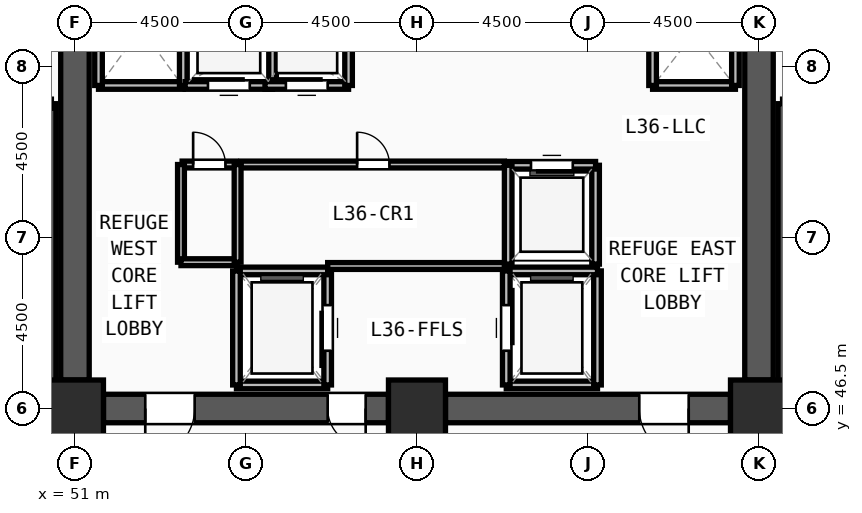
"""IFC4 building model, lengths in metres.
Left out: names, types, materials, properties, quantities, classifications, styles, units other than length and angle.
Written with IfcOpenShell. Run it as: python <this file> out.ifc"""

import sys

from ifc_helpers import new_model, si_unit, direction, frame, frame_2d, origin, origin_2d, place, context, subcontext, project, spatial, rectangle, extrude, source, transform, mapped, element, fill, save


model = new_model("IFC4")
c1 = context("Model", 3, precision=1e-05, world=origin(), true_north=direction((0.0, 1.0)))
c2 = subcontext(c1, "Body", "Model", "MODEL_VIEW")
j1 = project(units=[si_unit("LENGTHUNIT", "METRE"), si_unit("PLANEANGLEUNIT", "RADIAN")], contexts=[c1])
p1 = place(None, origin())
s1 = spatial("IfcSite", under=j1, at=p1, CompositionType="ELEMENT")
p2 = place(p1, origin())
s2 = spatial("IfcBuilding", under=s1, at=p2, CompositionType="ELEMENT")
p3 = place(p2, frame((0.0, 0.0, 139.5)))
s3 = spatial("IfcBuildingStorey", under=s2, at=p3, CompositionType="ELEMENT", Elevation=139.5)
m1 = source(origin(), c2, "Body", "SweptSolid", [
    extrude(rectangle(XDim=1.5, YDim=1.5, at=origin_2d()), origin(), (0.0, 0.0, 1.0), 4.5),
])
for number, where, z_axis, x_axis in (
    (1, (51.0, 46.5, 0.0), (0.0, 0.0, 1.0), (1.0, 0.0, 0.0)),
    (2, (60.0, 46.5, 0.0), (0.0, 0.0, 1.0), (1.0, 0.0, 0.0)),
    (3, (69.0, 46.5, 0.0), (0.0, 0.0, 1.0), (1.0, 0.0, 0.0)),
):
    element("IfcColumn", number, at=place(p3, frame(where, z_axis=z_axis, x_axis=x_axis)), inside=s3, PredefinedType="COLUMN", context=c2, shape_type="MappedRepresentation", body=[
        mapped(m1, transform((0.0, 0.0, 0.0), x_axis=(1.0, 0.0, 0.0), y_axis=(0.0, 1.0, 0.0), z_axis=(0.0, 0.0, 1.0), scale=1.0)),
    ])
p4 = place(p3, frame((69.0, 60.75, 0.0), z_axis=(0.0, 0.0, 1.0), x_axis=(0.0, -1.0, 0.0)))
e4 = element("IfcWall", 4, at=p4, inside=s3, PredefinedType="SHEAR", context=c2, shape_type="SweptSolid", body=[
    extrude(rectangle(XDim=13.5, YDim=0.75, at=frame_2d((6.75, 0.0))), origin(), (0.0, 0.0, 1.0), 4.32),
])
m2 = source(origin(), c2, "Body", "SweptSolid", [
    extrude(rectangle(XDim=1.2, YDim=2.2, at=frame_2d((0.6, 1.1))), frame((0.0, 0.385, 0.0), z_axis=(0.0, -1.0, 0.0), x_axis=(1.0, 0.0, 0.0)), (0.0, 0.0, 1.0), 0.77),
])
p5 = place(p4, frame((1.2, 0.0, 0.0)))
e5 = element("IfcOpeningElement", 5, at=p5, cuts=e4, PredefinedType="OPENING", context=c2, shape_type="MappedRepresentation", body=[
    mapped(m2, transform((0.0, 0.0, 0.0), x_axis=(1.0, 0.0, 0.0), y_axis=(0.0, 1.0, 0.0), z_axis=(0.0, 0.0, 1.0), scale=1.0)),
])
p6 = place(p3, frame((68.25, 46.5, 0.0), z_axis=(0.0, 0.0, 1.0), x_axis=(-1.0, 0.0, 0.0)))
e6 = element("IfcWall", 6, at=p6, inside=s3, PredefinedType="SHEAR", context=c2, shape_type="SweptSolid", body=[
    extrude(rectangle(XDim=7.5, YDim=0.75, at=frame_2d((3.75, 0.0))), origin(), (0.0, 0.0, 1.0), 4.32),
])
m3 = source(origin(), c2, "Body", "SweptSolid", [
    extrude(rectangle(XDim=1.3, YDim=2.2, at=frame_2d((0.65, 1.1))), frame((0.0, 0.385, 0.0), z_axis=(0.0, -1.0, 0.0), x_axis=(1.0, 0.0, 0.0)), (0.0, 0.0, 1.0), 0.77),
])
p7 = place(p6, frame((1.1, 0.0, 0.0)))
e7 = element("IfcOpeningElement", 7, at=p7, cuts=e6, PredefinedType="OPENING", context=c2, shape_type="MappedRepresentation", body=[
    mapped(m3, transform((0.0, 0.0, 0.0), x_axis=(1.0, 0.0, 0.0), y_axis=(0.0, 1.0, 0.0), z_axis=(0.0, 0.0, 1.0), scale=1.0)),
])
p8 = place(p3, frame((59.25, 46.5, 0.0), z_axis=(0.0, 0.0, 1.0), x_axis=(-1.0, 0.0, 0.0)))
e8 = element("IfcWall", 8, at=p8, inside=s3, PredefinedType="SHEAR", context=c2, shape_type="SweptSolid", body=[
    extrude(rectangle(XDim=7.5, YDim=0.75, at=frame_2d((3.75, 0.0))), origin(), (0.0, 0.0, 1.0), 4.32),
])
p9 = place(p8, frame((5.1, 0.0, 0.0)))
e9 = element("IfcOpeningElement", 9, at=p9, cuts=e8, PredefinedType="OPENING", context=c2, shape_type="MappedRepresentation", body=[
    mapped(m3, transform((0.0, 0.0, 0.0), x_axis=(1.0, 0.0, 0.0), y_axis=(0.0, 1.0, 0.0), z_axis=(0.0, 0.0, 1.0), scale=1.0)),
])
m4 = source(origin(), c2, "Body", "SweptSolid", [
    extrude(rectangle(XDim=1.0, YDim=2.2, at=frame_2d((0.5, 1.1))), frame((0.0, 0.385, 0.0), z_axis=(0.0, -1.0, 0.0), x_axis=(1.0, 0.0, 0.0)), (0.0, 0.0, 1.0), 0.77),
])
p10 = place(p8, frame((0.6, 0.0, 0.0)))
e10 = element("IfcOpeningElement", 10, at=p10, cuts=e8, PredefinedType="OPENING", context=c2, shape_type="MappedRepresentation", body=[
    mapped(m4, transform((0.0, 0.0, 0.0), x_axis=(1.0, 0.0, 0.0), y_axis=(0.0, 1.0, 0.0), z_axis=(0.0, 0.0, 1.0), scale=1.0)),
])
p11 = place(p3, frame((51.0, 47.25, 0.0), z_axis=(0.0, 0.0, 1.0), x_axis=(0.0, 1.0, 0.0)))
e11 = element("IfcWall", 11, at=p11, inside=s3, PredefinedType="SHEAR", context=c2, shape_type="SweptSolid", body=[
    extrude(rectangle(XDim=13.5, YDim=0.75, at=frame_2d((6.75, 0.0))), origin(), (0.0, 0.0, 1.0), 4.32),
])
for number, where, z_axis, x_axis in (
    (12, (50.38, 46.7, 0.0), (0.0, 0.0, 1.0), (0.0, 1.0, 0.0)),
    (13, (69.62, 54.52, 0.0), (0.0, 0.0, 1.0), (0.0, -1.0, 0.0)),
):
    element("IfcWall", number, at=place(p3, frame(where, z_axis=z_axis, x_axis=x_axis)), inside=s3, PredefinedType="SOLIDWALL", context=c2, shape_type="SweptSolid", body=[
        extrude(rectangle(XDim=7.82, YDim=0.24, at=frame_2d((3.91, 0.0))), origin(), (0.0, 0.0, 1.0), 4.32),
    ])
p12 = place(p3, frame((55.25, 47.12, 0.0), z_axis=(0.0, 0.0, 1.0), x_axis=(1.0, 0.0, 0.0)))
e14 = element("IfcWall", 14, at=p12, inside=s3, PredefinedType="SOLIDWALL", context=c2, shape_type="SweptSolid", body=[
    extrude(rectangle(XDim=2.4, YDim=0.2, at=frame_2d((1.2, 0.0))), origin(), (0.0, 0.0, 1.0), 4.32),
])
p13 = place(p3, frame((57.65, 47.12, 0.0), z_axis=(0.0, 0.0, 1.0), x_axis=(0.0, 1.0, 0.0)))
e15 = element("IfcWall", 15, at=p13, inside=s3, PredefinedType="SOLIDWALL", context=c2, shape_type="SweptSolid", body=[
    extrude(rectangle(XDim=3.0, YDim=0.2, at=frame_2d((1.5, 0.0))), origin(), (0.0, 0.0, 1.0), 4.32),
])
m5 = source(origin(), c2, "Body", "SweptSolid", [
    extrude(rectangle(XDim=1.2, YDim=2.3, at=frame_2d((0.6, 1.15))), frame((0.0, 0.11, 0.0), z_axis=(0.0, -1.0, 0.0), x_axis=(1.0, 0.0, 0.0)), (0.0, 0.0, 1.0), 0.22),
])
p14 = place(p13, frame((0.9, 0.0, 0.0)))
e16 = element("IfcOpeningElement", 16, at=p14, cuts=e15, PredefinedType="OPENING", context=c2, shape_type="MappedRepresentation", body=[
    mapped(m5, transform((0.0, 0.0, 0.0), x_axis=(1.0, 0.0, 0.0), y_axis=(0.0, 1.0, 0.0), z_axis=(0.0, 0.0, 1.0), scale=1.0)),
])
p15 = place(p3, frame((57.65, 50.12, 0.0), z_axis=(0.0, 0.0, 1.0), x_axis=(-1.0, 0.0, 0.0)))
e17 = element("IfcWall", 17, at=p15, inside=s3, PredefinedType="SOLIDWALL", context=c2, shape_type="SweptSolid", body=[
    extrude(rectangle(XDim=2.4, YDim=0.2, at=frame_2d((1.2, 0.0))), origin(), (0.0, 0.0, 1.0), 4.32),
])
p16 = place(p3, frame((55.25, 50.12, 0.0), z_axis=(0.0, 0.0, 1.0), x_axis=(0.0, -1.0, 0.0)))
e18 = element("IfcWall", 18, at=p16, inside=s3, PredefinedType="SOLIDWALL", context=c2, shape_type="SweptSolid", body=[
    extrude(rectangle(XDim=3.0, YDim=0.2, at=frame_2d((1.5, 0.0))), origin(), (0.0, 0.0, 1.0), 4.32),
])
p17 = place(p3, frame((62.35, 47.12, 0.0), z_axis=(0.0, 0.0, 1.0), x_axis=(1.0, 0.0, 0.0)))
e19 = element("IfcWall", 19, at=p17, inside=s3, PredefinedType="SOLIDWALL", context=c2, shape_type="SweptSolid", body=[
    extrude(rectangle(XDim=2.4, YDim=0.2, at=frame_2d((1.2, 0.0))), origin(), (0.0, 0.0, 1.0), 4.32),
])
p18 = place(p3, frame((64.75, 47.12, 0.0), z_axis=(0.0, 0.0, 1.0), x_axis=(0.0, 1.0, 0.0)))
e20 = element("IfcWall", 20, at=p18, inside=s3, PredefinedType="SOLIDWALL", context=c2, shape_type="SweptSolid", body=[
    extrude(rectangle(XDim=3.0, YDim=0.2, at=frame_2d((1.5, 0.0))), origin(), (0.0, 0.0, 1.0), 4.32),
])
p19 = place(p3, frame((64.75, 50.12, 0.0), z_axis=(0.0, 0.0, 1.0), x_axis=(-1.0, 0.0, 0.0)))
e21 = element("IfcWall", 21, at=p19, inside=s3, PredefinedType="SOLIDWALL", context=c2, shape_type="SweptSolid", body=[
    extrude(rectangle(XDim=2.4, YDim=0.2, at=frame_2d((1.2, 0.0))), origin(), (0.0, 0.0, 1.0), 4.32),
])
p20 = place(p3, frame((62.35, 50.12, 0.0), z_axis=(0.0, 0.0, 1.0), x_axis=(0.0, -1.0, 0.0)))
e22 = element("IfcWall", 22, at=p20, inside=s3, PredefinedType="SOLIDWALL", context=c2, shape_type="SweptSolid", body=[
    extrude(rectangle(XDim=3.0, YDim=0.2, at=frame_2d((1.5, 0.0))), origin(), (0.0, 0.0, 1.0), 4.32),
])
p21 = place(p20, frame((0.9, 0.0, 0.0)))
e23 = element("IfcOpeningElement", 23, at=p21, cuts=e22, PredefinedType="OPENING", context=c2, shape_type="MappedRepresentation", body=[
    mapped(m5, transform((0.0, 0.0, 0.0), x_axis=(1.0, 0.0, 0.0), y_axis=(0.0, 1.0, 0.0), z_axis=(0.0, 0.0, 1.0), scale=1.0)),
])
p22 = place(p3, frame((51.62, 55.0, 0.0), z_axis=(0.0, 0.0, 1.0), x_axis=(1.0, 0.0, 0.0)))
e24 = element("IfcWall", 24, at=p22, inside=s3, PredefinedType="SOLIDWALL", context=c2, shape_type="SweptSolid", body=[
    extrude(rectangle(XDim=2.23, YDim=0.2, at=frame_2d((1.115, 0.0))), origin(), (0.0, 0.0, 1.0), 4.32),
])
for number, where, z_axis, x_axis in (
    (25, (53.85, 55.0, 0.0), (0.0, 0.0, 1.0), (0.0, 1.0, 0.0)),
    (26, (51.62, 58.0, 0.0), (0.0, 0.0, 1.0), (0.0, -1.0, 0.0)),
):
    element("IfcWall", number, at=place(p3, frame(where, z_axis=z_axis, x_axis=x_axis)), inside=s3, PredefinedType="SOLIDWALL", context=c2, shape_type="SweptSolid", body=[
        extrude(rectangle(XDim=3.0, YDim=0.2, at=frame_2d((1.5, 0.0))), origin(), (0.0, 0.0, 1.0), 4.32),
    ])
p23 = place(p3, frame((66.2, 55.0, 0.0), z_axis=(0.0, 0.0, 1.0), x_axis=(1.0, 0.0, 0.0)))
e27 = element("IfcWall", 27, at=p23, inside=s3, PredefinedType="SOLIDWALL", context=c2, shape_type="SweptSolid", body=[
    extrude(rectangle(XDim=2.18, YDim=0.2, at=frame_2d((1.09, 0.0))), origin(), (0.0, 0.0, 1.0), 4.32),
])
for number, where, z_axis, x_axis in (
    (28, (68.38, 55.0, 0.0), (0.0, 0.0, 1.0), (0.0, 1.0, 0.0)),
    (29, (66.2, 57.75, 0.0), (0.0, 0.0, 1.0), (0.0, -1.0, 0.0)),
):
    element("IfcWall", number, at=place(p3, frame(where, z_axis=z_axis, x_axis=x_axis)), inside=s3, PredefinedType="SOLIDWALL", context=c2, shape_type="SweptSolid", body=[
        extrude(rectangle(XDim=2.75, YDim=0.2, at=frame_2d((1.375, 0.0))), origin(), (0.0, 0.0, 1.0), 4.32),
    ])
p24 = place(p3, frame((64.7, 50.3, 0.0), z_axis=(0.0, 0.0, 1.0), x_axis=(0.0, 1.0, 0.0)))
e30 = element("IfcWall", 30, at=p24, inside=s3, PredefinedType="SOLIDWALL", context=c2, shape_type="SweptSolid", body=[
    extrude(rectangle(XDim=2.6, YDim=0.2, at=frame_2d((1.3, 0.0))), origin(), (0.0, 0.0, 1.0), 4.32),
])
p25 = place(p3, frame((64.7, 52.9, 0.0), z_axis=(0.0, 0.0, 1.0), x_axis=(-1.0, 0.0, 0.0)))
e31 = element("IfcWall", 31, at=p25, inside=s3, PredefinedType="SOLIDWALL", context=c2, shape_type="SweptSolid", body=[
    extrude(rectangle(XDim=2.3, YDim=0.2, at=frame_2d((1.15, 0.0))), origin(), (0.0, 0.0, 1.0), 4.32),
])
m6 = source(origin(), c2, "Body", "SweptSolid", [
    extrude(rectangle(XDim=1.1, YDim=2.2, at=frame_2d((0.55, 1.1))), frame((0.0, 0.11, 0.0), z_axis=(0.0, -1.0, 0.0), x_axis=(1.0, 0.0, 0.0)), (0.0, 0.0, 1.0), 0.22),
])
p26 = place(p25, frame((0.6, 0.0, 0.0)))
e32 = element("IfcOpeningElement", 32, at=p26, cuts=e31, PredefinedType="OPENING", context=c2, shape_type="MappedRepresentation", body=[
    mapped(m6, transform((0.0, 0.0, 0.0), x_axis=(1.0, 0.0, 0.0), y_axis=(0.0, 1.0, 0.0), z_axis=(0.0, 0.0, 1.0), scale=1.0)),
])
p27 = place(p3, frame((62.4, 52.9, 0.0), z_axis=(0.0, 0.0, 1.0), x_axis=(0.0, -1.0, 0.0)))
e33 = element("IfcWall", 33, at=p27, inside=s3, PredefinedType="SOLIDWALL", context=c2, shape_type="SweptSolid", body=[
    extrude(rectangle(XDim=2.6, YDim=0.2, at=frame_2d((1.3, 0.0))), origin(), (0.0, 0.0, 1.0), 4.32),
])
p28 = place(p3, frame((53.9, 55.0, 0.0), z_axis=(0.0, 0.0, 1.0), x_axis=(1.0, 0.0, 0.0)))
e34 = element("IfcWall", 34, at=p28, inside=s3, PredefinedType="SOLIDWALL", context=c2, shape_type="SweptSolid", body=[
    extrude(rectangle(XDim=2.3, YDim=0.2, at=frame_2d((1.15, 0.0))), origin(), (0.0, 0.0, 1.0), 4.32),
])
p29 = place(p28, frame((0.6, 0.0, 0.0)))
e35 = element("IfcOpeningElement", 35, at=p29, cuts=e34, PredefinedType="OPENING", context=c2, shape_type="MappedRepresentation", body=[
    mapped(m6, transform((0.0, 0.0, 0.0), x_axis=(1.0, 0.0, 0.0), y_axis=(0.0, 1.0, 0.0), z_axis=(0.0, 0.0, 1.0), scale=1.0)),
])
p30 = place(p3, frame((56.2, 55.0, 0.0), z_axis=(0.0, 0.0, 1.0), x_axis=(0.0, 1.0, 0.0)))
e36 = element("IfcWall", 36, at=p30, inside=s3, PredefinedType="SOLIDWALL", context=c2, shape_type="SweptSolid", body=[
    extrude(rectangle(XDim=2.6, YDim=0.2, at=frame_2d((1.3, 0.0))), origin(), (0.0, 0.0, 1.0), 4.32),
])
p31 = place(p3, frame((56.0, 55.0, 0.0), z_axis=(0.0, 0.0, 1.0), x_axis=(1.0, 0.0, 0.0)))
e37 = element("IfcWall", 37, at=p31, inside=s3, PredefinedType="SOLIDWALL", context=c2, shape_type="SweptSolid", body=[
    extrude(rectangle(XDim=2.2, YDim=0.2, at=frame_2d((1.1, 0.0))), origin(), (0.0, 0.0, 1.0), 4.32),
])
p32 = place(p31, frame((0.55, 0.0, 0.0)))
e38 = element("IfcOpeningElement", 38, at=p32, cuts=e37, PredefinedType="OPENING", context=c2, shape_type="MappedRepresentation", body=[
    mapped(m6, transform((0.0, 0.0, 0.0), x_axis=(1.0, 0.0, 0.0), y_axis=(0.0, 1.0, 0.0), z_axis=(0.0, 0.0, 1.0), scale=1.0)),
])
p33 = place(p3, frame((58.2, 55.0, 0.0), z_axis=(0.0, 0.0, 1.0), x_axis=(0.0, 1.0, 0.0)))
e39 = element("IfcWall", 39, at=p33, inside=s3, PredefinedType="SOLIDWALL", context=c2, shape_type="SweptSolid", body=[
    extrude(rectangle(XDim=2.6, YDim=0.2, at=frame_2d((1.3, 0.0))), origin(), (0.0, 0.0, 1.0), 4.32),
])
p34 = place(p3, frame((55.37, 52.92, 0.0), z_axis=(0.0, 0.0, 1.0), x_axis=(1.0, 0.0, 0.0)))
e40 = element("IfcWall", 40, at=p34, inside=s3, PredefinedType="PARTITIONING", context=c2, shape_type="SweptSolid", body=[
    extrude(rectangle(XDim=6.93, YDim=0.18, at=frame_2d((3.465, 0.0))), origin(), (0.0, 0.0, 1.0), 4.32),
])
m7 = source(origin(), c2, "Body", "SweptSolid", [
    extrude(rectangle(XDim=0.85, YDim=2.1, at=frame_2d((0.425, 1.05))), frame((0.0, 0.1, 0.0), z_axis=(0.0, -1.0, 0.0), x_axis=(1.0, 0.0, 0.0)), (0.0, 0.0, 1.0), 0.2),
])
p35 = place(p34, frame((3.055, 0.0, 0.0)))
e41 = element("IfcOpeningElement", 41, at=p35, cuts=e40, PredefinedType="OPENING", context=c2, shape_type="MappedRepresentation", body=[
    mapped(m7, transform((0.0, 0.0, 0.0), x_axis=(1.0, 0.0, 0.0), y_axis=(0.0, 1.0, 0.0), z_axis=(0.0, 0.0, 1.0), scale=1.0)),
])
p36 = place(p3, frame((53.82, 52.92, 0.0), z_axis=(0.0, 0.0, 1.0), x_axis=(1.0, 0.0, 0.0)))
e42 = element("IfcWall", 42, at=p36, inside=s3, PredefinedType="PARTITIONING", context=c2, shape_type="SweptSolid", body=[
    extrude(rectangle(XDim=1.43, YDim=0.18, at=frame_2d((0.715, 0.0))), origin(), (0.0, 0.0, 1.0), 4.32),
])
p37 = place(p36, frame((0.29, 0.0, 0.0)))
e43 = element("IfcOpeningElement", 43, at=p37, cuts=e42, PredefinedType="OPENING", context=c2, shape_type="MappedRepresentation", body=[
    mapped(m7, transform((0.0, 0.0, 0.0), x_axis=(1.0, 0.0, 0.0), y_axis=(0.0, 1.0, 0.0), z_axis=(0.0, 0.0, 1.0), scale=1.0)),
])
p38 = place(p3, frame((53.79, 50.35, 0.0), z_axis=(0.0, 0.0, 1.0), x_axis=(0.0, 1.0, 0.0)))
e44 = element("IfcWall", 44, at=p38, inside=s3, PredefinedType="PARTITIONING", context=c2, shape_type="SweptSolid", body=[
    extrude(rectangle(XDim=2.57, YDim=0.18, at=frame_2d((1.285, 0.0))), origin(), (0.0, 0.0, 1.0), 4.32),
])
p39 = place(p3, frame((53.79, 50.35, 0.0), z_axis=(0.0, 0.0, 1.0), x_axis=(1.0, 0.0, 0.0)))
e45 = element("IfcWall", 45, at=p39, inside=s3, PredefinedType="PARTITIONING", context=c2, shape_type="SweptSolid", body=[
    extrude(rectangle(XDim=1.49, YDim=0.18, at=frame_2d((0.745, 0.0))), origin(), (0.0, 0.0, 1.0), 4.32),
])
p40 = place(p3, frame((55.28, 50.35, 0.0), z_axis=(0.0, 0.0, 1.0), x_axis=(0.0, 1.0, 0.0)))
e46 = element("IfcWall", 46, at=p40, inside=s3, PredefinedType="PARTITIONING", context=c2, shape_type="SweptSolid", body=[
    extrude(rectangle(XDim=2.57, YDim=0.18, at=frame_2d((1.285, 0.0))), origin(), (0.0, 0.0, 1.0), 4.32),
])
p41 = place(p3, frame((57.65, 50.25, 0.0), z_axis=(0.0, 0.0, 1.0), x_axis=(1.0, 0.0, 0.0)))
e47 = element("IfcWall", 47, at=p41, inside=s3, PredefinedType="PARTITIONING", context=c2, shape_type="SweptSolid", body=[
    extrude(rectangle(XDim=4.65, YDim=0.18, at=frame_2d((2.325, 0.0))), origin(), (0.0, 0.0, 1.0), 4.32),
])
m8 = source(origin(), c2, "Body", "SweptSolid", [
    extrude(rectangle(XDim=1.3, YDim=2.2, at=frame_2d((0.65, 1.1))), frame((0.0, 0.025, 0.0), z_axis=(0.0, -1.0, 0.0), x_axis=(1.0, 0.0, 0.0)), (0.0, 0.0, 1.0), 0.05),
])
p42 = place(p9, origin())
e48 = element("IfcDoor", 48, at=p42, inside=s3, OperationType="SINGLE_SWING_RIGHT", PredefinedType="DOOR", context=c2, shape_type="MappedRepresentation", body=[
    mapped(m8, transform((0.0, 0.0, 0.0), x_axis=(1.0, 0.0, 0.0), y_axis=(0.0, 1.0, 0.0), z_axis=(0.0, 0.0, 1.0), scale=1.0)),
])
fill(e9, e48)
m9 = source(origin(), c2, "Body", "SweptSolid", [
    extrude(rectangle(XDim=1.0, YDim=2.2, at=frame_2d((0.5, 1.1))), frame((0.0, 0.025, 0.0), z_axis=(0.0, -1.0, 0.0), x_axis=(1.0, 0.0, 0.0)), (0.0, 0.0, 1.0), 0.05),
])
p43 = place(p10, origin())
e49 = element("IfcDoor", 49, at=p43, inside=s3, OperationType="SINGLE_SWING_LEFT", PredefinedType="DOOR", context=c2, shape_type="MappedRepresentation", body=[
    mapped(m9, transform((0.0, 0.0, 0.0), x_axis=(1.0, 0.0, 0.0), y_axis=(0.0, 1.0, 0.0), z_axis=(0.0, 0.0, 1.0), scale=1.0)),
])
fill(e10, e49)
p44 = place(p7, origin())
e50 = element("IfcDoor", 50, at=p44, inside=s3, OperationType="SINGLE_SWING_LEFT", PredefinedType="DOOR", context=c2, shape_type="MappedRepresentation", body=[
    mapped(m8, transform((0.0, 0.0, 0.0), x_axis=(1.0, 0.0, 0.0), y_axis=(0.0, 1.0, 0.0), z_axis=(0.0, 0.0, 1.0), scale=1.0)),
])
fill(e7, e50)
m10 = source(origin(), c2, "Body", "SweptSolid", [
    extrude(rectangle(XDim=1.2, YDim=2.3, at=frame_2d((0.6, 1.15))), frame((0.0, 0.025, 0.0), z_axis=(0.0, -1.0, 0.0), x_axis=(1.0, 0.0, 0.0)), (0.0, 0.0, 1.0), 0.05),
])
p45 = place(p14, origin())
e51 = element("IfcDoor", 51, at=p45, inside=s3, OperationType="SLIDING_TO_LEFT", PredefinedType="DOOR", context=c2, shape_type="MappedRepresentation", body=[
    mapped(m10, transform((0.0, 0.0, 0.0), x_axis=(1.0, 0.0, 0.0), y_axis=(0.0, 1.0, 0.0), z_axis=(0.0, 0.0, 1.0), scale=1.0)),
])
fill(e16, e51)
p46 = place(p21, origin())
e52 = element("IfcDoor", 52, at=p46, inside=s3, OperationType="SLIDING_TO_LEFT", PredefinedType="DOOR", context=c2, shape_type="MappedRepresentation", body=[
    mapped(m10, transform((0.0, 0.0, 0.0), x_axis=(1.0, 0.0, 0.0), y_axis=(0.0, 1.0, 0.0), z_axis=(0.0, 0.0, 1.0), scale=1.0)),
])
fill(e23, e52)
m11 = source(origin(), c2, "Body", "SweptSolid", [
    extrude(rectangle(XDim=1.1, YDim=2.2, at=frame_2d((0.55, 1.1))), frame((0.0, 0.025, 0.0), z_axis=(0.0, -1.0, 0.0), x_axis=(1.0, 0.0, 0.0)), (0.0, 0.0, 1.0), 0.05),
])
p47 = place(p26, origin())
e53 = element("IfcDoor", 53, at=p47, inside=s3, OperationType="SLIDING_TO_LEFT", PredefinedType="DOOR", context=c2, shape_type="MappedRepresentation", body=[
    mapped(m11, transform((0.0, 0.0, 0.0), x_axis=(1.0, 0.0, 0.0), y_axis=(0.0, 1.0, 0.0), z_axis=(0.0, 0.0, 1.0), scale=1.0)),
])
fill(e32, e53)
p48 = place(p29, origin())
e54 = element("IfcDoor", 54, at=p48, inside=s3, OperationType="SLIDING_TO_LEFT", PredefinedType="DOOR", context=c2, shape_type="MappedRepresentation", body=[
    mapped(m11, transform((0.0, 0.0, 0.0), x_axis=(1.0, 0.0, 0.0), y_axis=(0.0, 1.0, 0.0), z_axis=(0.0, 0.0, 1.0), scale=1.0)),
])
fill(e35, e54)
p49 = place(p32, origin())
e55 = element("IfcDoor", 55, at=p49, inside=s3, OperationType="SLIDING_TO_LEFT", PredefinedType="DOOR", context=c2, shape_type="MappedRepresentation", body=[
    mapped(m11, transform((0.0, 0.0, 0.0), x_axis=(1.0, 0.0, 0.0), y_axis=(0.0, 1.0, 0.0), z_axis=(0.0, 0.0, 1.0), scale=1.0)),
])
fill(e38, e55)
m12 = source(origin(), c2, "Body", "SweptSolid", [
    extrude(rectangle(XDim=0.85, YDim=2.1, at=frame_2d((0.425, 1.05))), frame((0.0, 0.025, 0.0), z_axis=(0.0, -1.0, 0.0), x_axis=(1.0, 0.0, 0.0)), (0.0, 0.0, 1.0), 0.05),
])
p50 = place(p35, origin())
e56 = element("IfcDoor", 56, at=p50, inside=s3, OperationType="SINGLE_SWING_LEFT", PredefinedType="DOOR", context=c2, shape_type="MappedRepresentation", body=[
    mapped(m12, transform((0.0, 0.0, 0.0), x_axis=(1.0, 0.0, 0.0), y_axis=(0.0, 1.0, 0.0), z_axis=(0.0, 0.0, 1.0), scale=1.0)),
])
fill(e41, e56)
p51 = place(p37, origin())
e57 = element("IfcDoor", 57, at=p51, inside=s3, OperationType="SINGLE_SWING_LEFT", PredefinedType="DOOR", context=c2, shape_type="MappedRepresentation", body=[
    mapped(m12, transform((0.0, 0.0, 0.0), x_axis=(1.0, 0.0, 0.0), y_axis=(0.0, 1.0, 0.0), z_axis=(0.0, 0.0, 1.0), scale=1.0)),
])
fill(e43, e57)
save(model, sys.argv[1])
